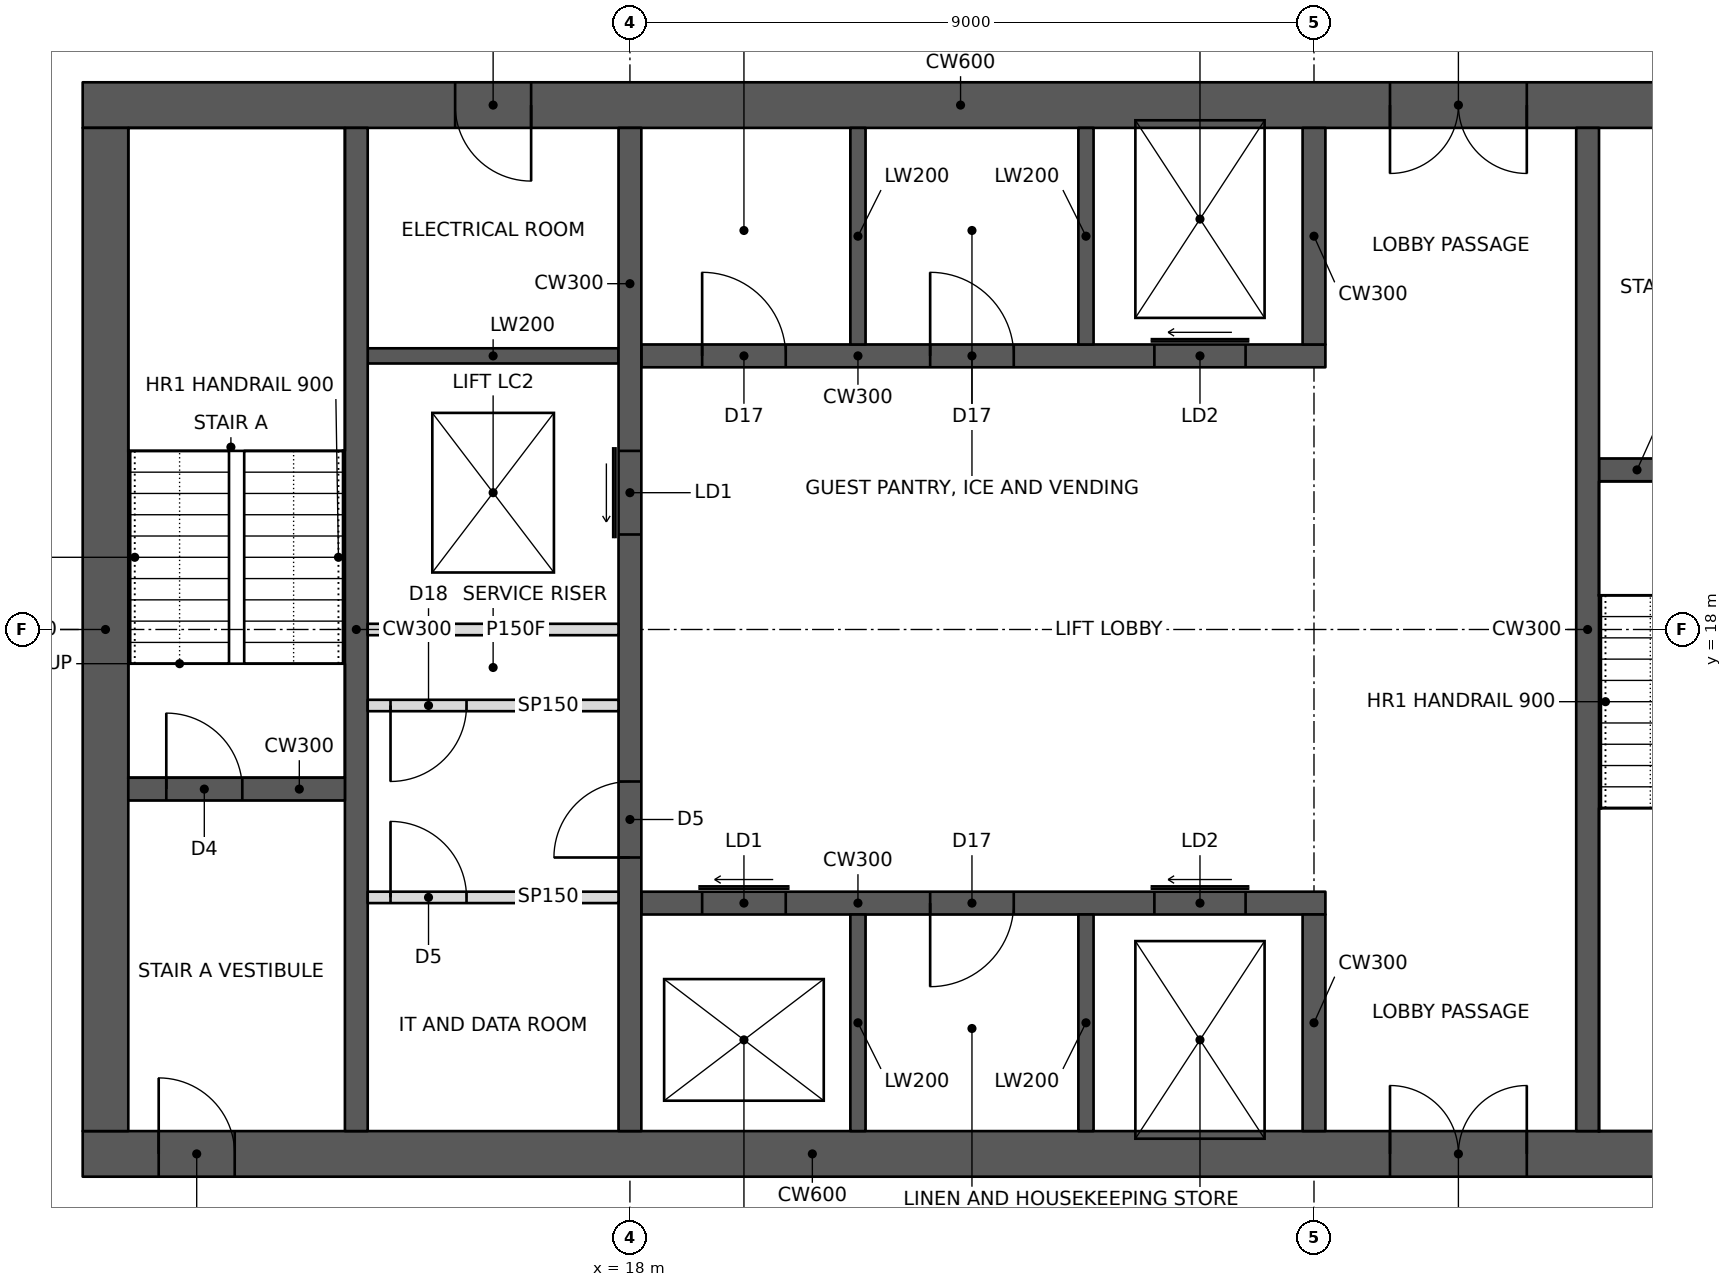
"""IFC4 building model, lengths in metres.
Left out: names, types, materials, properties, quantities, classifications, styles, units other than length and angle.
Written with IfcOpenShell. Run it as: python <this file> out.ifc"""

import sys

from ifc_helpers import new_model, si_unit, direction, frame, frame_2d, origin, place, context, subcontext, project, spatial, rectangle, extrude, element, fill, save


model = new_model("IFC4")
c1 = context("Model", 3, precision=1e-05, world=origin(), true_north=direction((0.0, 1.0)))
c2 = subcontext(c1, "Body", "Model", "MODEL_VIEW")
j1 = project(units=[si_unit("LENGTHUNIT", "METRE"), si_unit("PLANEANGLEUNIT", "RADIAN")], contexts=[c1])
p1 = place(None, origin())
s1 = spatial("IfcSite", under=j1, at=p1, CompositionType="ELEMENT")
p2 = place(p1, origin())
s2 = spatial("IfcBuilding", under=s1, at=p2, CompositionType="ELEMENT")
p3 = place(p2, frame((0.0, 0.0, 233.8)))
s3 = spatial("IfcBuildingStorey", under=s2, at=p3, CompositionType="ELEMENT", Elevation=233.8)
p4 = place(p3, frame((10.8, 11.1, 0.0), z_axis=(0.0, 0.0, 1.0), x_axis=(1.0, 0.0, 0.0)))
e1 = element("IfcWall", 1, at=p4, inside=s3, PredefinedType="SHEAR", context=c2, shape_type="SweptSolid", body=[
    extrude(rectangle(XDim=23.4, YDim=0.6, at=frame_2d((11.7, 0.0))), origin(), (0.0, 0.0, 1.0), 3.6),
])
p5 = place(p4, frame((1.0, 0.0, 0.0)))
e2 = element("IfcOpeningElement", 2, at=p5, cuts=e1, PredefinedType="OPENING", context=c2, shape_type="SweptSolid", body=[
    extrude(rectangle(XDim=1.0, YDim=2.1, at=frame_2d((0.5, 1.05))), frame((0.0, 0.31, 0.0), z_axis=(0.0, -1.0, 0.0), x_axis=(1.0, 0.0, 0.0)), (0.0, 0.0, 1.0), 0.62),
])
p6 = place(p4, frame((17.2, 0.0, 0.0)))
e3 = element("IfcOpeningElement", 3, at=p6, cuts=e1, PredefinedType="OPENING", context=c2, shape_type="SweptSolid", body=[
    extrude(rectangle(XDim=1.8, YDim=2.1, at=frame_2d((0.9, 1.05))), frame((0.0, 0.31, 0.0), z_axis=(0.0, -1.0, 0.0), x_axis=(1.0, 0.0, 0.0)), (0.0, 0.0, 1.0), 0.62),
])
p7 = place(p3, frame((10.8, 24.9, 0.0), z_axis=(0.0, 0.0, 1.0), x_axis=(1.0, 0.0, 0.0)))
e4 = element("IfcWall", 4, at=p7, inside=s3, PredefinedType="SHEAR", context=c2, shape_type="SweptSolid", body=[
    extrude(rectangle(XDim=23.4, YDim=0.6, at=frame_2d((11.7, 0.0))), origin(), (0.0, 0.0, 1.0), 3.6),
])
p8 = place(p7, frame((17.2, 0.0, 0.0)))
e5 = element("IfcOpeningElement", 5, at=p8, cuts=e4, PredefinedType="OPENING", context=c2, shape_type="SweptSolid", body=[
    extrude(rectangle(XDim=1.8, YDim=2.1, at=frame_2d((0.9, 1.05))), frame((0.0, 0.31, 0.0), z_axis=(0.0, -1.0, 0.0), x_axis=(1.0, 0.0, 0.0)), (0.0, 0.0, 1.0), 0.62),
])
p9 = place(p7, frame((21.1, 0.0, 0.0)))
e6 = element("IfcOpeningElement", 6, at=p9, cuts=e4, PredefinedType="OPENING", context=c2, shape_type="SweptSolid", body=[
    extrude(rectangle(XDim=1.0, YDim=2.1, at=frame_2d((0.5, 1.05))), frame((0.0, 0.31, 0.0), z_axis=(0.0, -1.0, 0.0), x_axis=(1.0, 0.0, 0.0)), (0.0, 0.0, 1.0), 0.62),
])
p10 = place(p7, frame((4.9, 0.0, 0.0)))
e7 = element("IfcOpeningElement", 7, at=p10, cuts=e4, PredefinedType="OPENING", context=c2, shape_type="SweptSolid", body=[
    extrude(rectangle(XDim=1.0, YDim=2.1, at=frame_2d((0.5, 1.05))), frame((0.0, 0.31, 0.0), z_axis=(0.0, -1.0, 0.0), x_axis=(1.0, 0.0, 0.0)), (0.0, 0.0, 1.0), 0.62),
])
p11 = place(p3, frame((11.1, 11.4, 0.0), z_axis=(0.0, 0.0, 1.0), x_axis=(0.0, 1.0, 0.0)))
e8 = element("IfcWall", 8, at=p11, inside=s3, PredefinedType="SHEAR", context=c2, shape_type="SweptSolid", body=[
    extrude(rectangle(XDim=13.2, YDim=0.6, at=frame_2d((6.6, 0.0))), origin(), (0.0, 0.0, 1.0), 3.6),
])
p12 = place(p3, frame((14.4, 11.4, 0.0), z_axis=(0.0, 0.0, 1.0), x_axis=(0.0, 1.0, 0.0)))
e9 = element("IfcWall", 9, at=p12, inside=s3, PredefinedType="SHEAR", context=c2, shape_type="SweptSolid", body=[
    extrude(rectangle(XDim=13.2, YDim=0.3, at=frame_2d((6.6, 0.0))), origin(), (0.0, 0.0, 1.0), 3.6),
])
p13 = place(p3, frame((11.4, 15.9, 0.0), z_axis=(0.0, 0.0, 1.0), x_axis=(1.0, 0.0, 0.0)))
e10 = element("IfcWall", 10, at=p13, inside=s3, PredefinedType="SHEAR", context=c2, shape_type="SweptSolid", body=[
    extrude(rectangle(XDim=2.85, YDim=0.3, at=frame_2d((1.425, 0.0))), origin(), (0.0, 0.0, 1.0), 3.6),
])
p14 = place(p13, frame((0.5, 0.0, 0.0)))
e11 = element("IfcOpeningElement", 11, at=p14, cuts=e10, PredefinedType="OPENING", context=c2, shape_type="SweptSolid", body=[
    extrude(rectangle(XDim=1.0, YDim=2.1, at=frame_2d((0.5, 1.05))), frame((0.0, 0.16, 0.0), z_axis=(0.0, -1.0, 0.0), x_axis=(1.0, 0.0, 0.0)), (0.0, 0.0, 1.0), 0.32),
])
p15 = place(p3, frame((18.0, 11.4, 0.0), z_axis=(0.0, 0.0, 1.0), x_axis=(0.0, 1.0, 0.0)))
e12 = element("IfcWall", 12, at=p15, inside=s3, PredefinedType="SHEAR", context=c2, shape_type="SweptSolid", body=[
    extrude(rectangle(XDim=13.2, YDim=0.3, at=frame_2d((6.6, 0.0))), origin(), (0.0, 0.0, 1.0), 3.6),
])
p16 = place(p15, frame((3.6, 0.0, 0.0)))
e13 = element("IfcOpeningElement", 13, at=p16, cuts=e12, PredefinedType="OPENING", context=c2, shape_type="SweptSolid", body=[
    extrude(rectangle(XDim=1.0, YDim=2.1, at=frame_2d((0.5, 1.05))), frame((0.0, 0.16, 0.0), z_axis=(0.0, -1.0, 0.0), x_axis=(1.0, 0.0, 0.0)), (0.0, 0.0, 1.0), 0.32),
])
p17 = place(p15, frame((7.85, 0.0, 0.0)))
e14 = element("IfcOpeningElement", 14, at=p17, cuts=e12, PredefinedType="OPENING", context=c2, shape_type="SweptSolid", body=[
    extrude(rectangle(XDim=1.1, YDim=2.1, at=frame_2d((0.55, 1.05))), frame((0.0, 0.16, 0.0), z_axis=(0.0, -1.0, 0.0), x_axis=(1.0, 0.0, 0.0)), (0.0, 0.0, 1.0), 0.32),
])
p18 = place(p3, frame((14.55, 18.0, 0.0), z_axis=(0.0, 0.0, 1.0), x_axis=(1.0, 0.0, 0.0)))
e15 = element("IfcWall", 15, at=p18, inside=s3, PredefinedType="PARTITIONING", context=c2, shape_type="SweptSolid", body=[
    extrude(rectangle(XDim=3.3, YDim=0.15, at=frame_2d((1.65, 0.0))), origin(), (0.0, 0.0, 1.0), 3.4),
])
p19 = place(p3, frame((18.15, 14.4, 0.0), z_axis=(0.0, 0.0, 1.0), x_axis=(1.0, 0.0, 0.0)))
e16 = element("IfcWall", 16, at=p19, inside=s3, PredefinedType="SHEAR", context=c2, shape_type="SweptSolid", body=[
    extrude(rectangle(XDim=9.0, YDim=0.3, at=frame_2d((4.5, 0.0))), origin(), (0.0, 0.0, 1.0), 3.6),
])
p20 = place(p19, frame((0.8, 0.0, 0.0)))
e17 = element("IfcOpeningElement", 17, at=p20, cuts=e16, PredefinedType="OPENING", context=c2, shape_type="SweptSolid", body=[
    extrude(rectangle(XDim=1.1, YDim=2.1, at=frame_2d((0.55, 1.05))), frame((0.0, 0.16, 0.0), z_axis=(0.0, -1.0, 0.0), x_axis=(1.0, 0.0, 0.0)), (0.0, 0.0, 1.0), 0.32),
])
p21 = place(p19, frame((6.75, 0.0, 0.0)))
e18 = element("IfcOpeningElement", 18, at=p21, cuts=e16, PredefinedType="OPENING", context=c2, shape_type="SweptSolid", body=[
    extrude(rectangle(XDim=1.2, YDim=2.1, at=frame_2d((0.6, 1.05))), frame((0.0, 0.16, 0.0), z_axis=(0.0, -1.0, 0.0), x_axis=(1.0, 0.0, 0.0)), (0.0, 0.0, 1.0), 0.32),
])
p22 = place(p19, frame((3.8, 0.0, 0.0)))
e19 = element("IfcOpeningElement", 19, at=p22, cuts=e16, PredefinedType="OPENING", context=c2, shape_type="SweptSolid", body=[
    extrude(rectangle(XDim=1.1, YDim=2.1, at=frame_2d((0.55, 1.05))), frame((0.0, 0.16, 0.0), z_axis=(0.0, -1.0, 0.0), x_axis=(1.0, 0.0, 0.0)), (0.0, 0.0, 1.0), 0.32),
])
p23 = place(p3, frame((27.0, 11.4, 0.0), z_axis=(0.0, 0.0, 1.0), x_axis=(0.0, 1.0, 0.0)))
e20 = element("IfcWall", 20, at=p23, inside=s3, PredefinedType="SHEAR", context=c2, shape_type="SweptSolid", body=[
    extrude(rectangle(XDim=2.85, YDim=0.3, at=frame_2d((1.425, 0.0))), origin(), (0.0, 0.0, 1.0), 3.6),
])
for number, where, z_axis, x_axis in (
    (21, (21.0, 11.4, 0.0), (0.0, 0.0, 1.0), (0.0, 1.0, 0.0)),
    (22, (24.0, 11.4, 0.0), (0.0, 0.0, 1.0), (0.0, 1.0, 0.0)),
):
    element("IfcWall", number, at=place(p3, frame(where, z_axis=z_axis, x_axis=x_axis)), inside=s3, PredefinedType="SHEAR", context=c2, shape_type="SweptSolid", body=[
        extrude(rectangle(XDim=2.85, YDim=0.2, at=frame_2d((1.425, 0.0))), origin(), (0.0, 0.0, 1.0), 3.6),
    ])
p24 = place(p3, frame((18.15, 21.6, 0.0), z_axis=(0.0, 0.0, 1.0), x_axis=(1.0, 0.0, 0.0)))
e23 = element("IfcWall", 23, at=p24, inside=s3, PredefinedType="SHEAR", context=c2, shape_type="SweptSolid", body=[
    extrude(rectangle(XDim=9.0, YDim=0.3, at=frame_2d((4.5, 0.0))), origin(), (0.0, 0.0, 1.0), 3.6),
])
p25 = place(p24, frame((6.75, 0.0, 0.0)))
e24 = element("IfcOpeningElement", 24, at=p25, cuts=e23, PredefinedType="OPENING", context=c2, shape_type="SweptSolid", body=[
    extrude(rectangle(XDim=1.2, YDim=2.1, at=frame_2d((0.6, 1.05))), frame((0.0, 0.16, 0.0), z_axis=(0.0, -1.0, 0.0), x_axis=(1.0, 0.0, 0.0)), (0.0, 0.0, 1.0), 0.32),
])
p26 = place(p24, frame((0.8, 0.0, 0.0)))
e25 = element("IfcOpeningElement", 25, at=p26, cuts=e23, PredefinedType="OPENING", context=c2, shape_type="SweptSolid", body=[
    extrude(rectangle(XDim=1.1, YDim=2.1, at=frame_2d((0.55, 1.05))), frame((0.0, 0.16, 0.0), z_axis=(0.0, -1.0, 0.0), x_axis=(1.0, 0.0, 0.0)), (0.0, 0.0, 1.0), 0.32),
])
p27 = place(p24, frame((3.8, 0.0, 0.0)))
e26 = element("IfcOpeningElement", 26, at=p27, cuts=e23, PredefinedType="OPENING", context=c2, shape_type="SweptSolid", body=[
    extrude(rectangle(XDim=1.1, YDim=2.1, at=frame_2d((0.55, 1.05))), frame((0.0, 0.16, 0.0), z_axis=(0.0, -1.0, 0.0), x_axis=(1.0, 0.0, 0.0)), (0.0, 0.0, 1.0), 0.32),
])
p28 = place(p3, frame((27.0, 21.75, 0.0), z_axis=(0.0, 0.0, 1.0), x_axis=(0.0, 1.0, 0.0)))
e27 = element("IfcWall", 27, at=p28, inside=s3, PredefinedType="SHEAR", context=c2, shape_type="SweptSolid", body=[
    extrude(rectangle(XDim=2.85, YDim=0.3, at=frame_2d((1.425, 0.0))), origin(), (0.0, 0.0, 1.0), 3.6),
])
for number, where, z_axis, x_axis in (
    (28, (21.0, 21.75, 0.0), (0.0, 0.0, 1.0), (0.0, 1.0, 0.0)),
    (29, (24.0, 21.75, 0.0), (0.0, 0.0, 1.0), (0.0, 1.0, 0.0)),
):
    element("IfcWall", number, at=place(p3, frame(where, z_axis=z_axis, x_axis=x_axis)), inside=s3, PredefinedType="SHEAR", context=c2, shape_type="SweptSolid", body=[
        extrude(rectangle(XDim=2.85, YDim=0.2, at=frame_2d((1.425, 0.0))), origin(), (0.0, 0.0, 1.0), 3.6),
    ])
p29 = place(p3, frame((30.6, 11.4, 0.0), z_axis=(0.0, 0.0, 1.0), x_axis=(0.0, 1.0, 0.0)))
e30 = element("IfcWall", 30, at=p29, inside=s3, PredefinedType="SHEAR", context=c2, shape_type="SweptSolid", body=[
    extrude(rectangle(XDim=13.2, YDim=0.3, at=frame_2d((6.6, 0.0))), origin(), (0.0, 0.0, 1.0), 3.6),
])
p30 = place(p3, frame((30.75, 20.1, 0.0), z_axis=(0.0, 0.0, 1.0), x_axis=(1.0, 0.0, 0.0)))
e31 = element("IfcWall", 31, at=p30, inside=s3, PredefinedType="SHEAR", context=c2, shape_type="SweptSolid", body=[
    extrude(rectangle(XDim=2.85, YDim=0.3, at=frame_2d((1.425, 0.0))), origin(), (0.0, 0.0, 1.0), 3.6),
])
p31 = place(p30, frame((1.15, 0.0, 0.0)))
e32 = element("IfcOpeningElement", 32, at=p31, cuts=e31, PredefinedType="OPENING", context=c2, shape_type="SweptSolid", body=[
    extrude(rectangle(XDim=1.0, YDim=2.1, at=frame_2d((0.5, 1.05))), frame((0.0, 0.16, 0.0), z_axis=(0.0, -1.0, 0.0), x_axis=(1.0, 0.0, 0.0)), (0.0, 0.0, 1.0), 0.32),
])
p32 = place(p3, frame((14.55, 21.6, 0.0), z_axis=(0.0, 0.0, 1.0), x_axis=(1.0, 0.0, 0.0)))
e33 = element("IfcWall", 33, at=p32, inside=s3, PredefinedType="SHEAR", context=c2, shape_type="SweptSolid", body=[
    extrude(rectangle(XDim=3.3, YDim=0.2, at=frame_2d((1.65, 0.0))), origin(), (0.0, 0.0, 1.0), 3.6),
])
p33 = place(p3, frame((14.55, 17.0, 0.0), z_axis=(0.0, 0.0, 1.0), x_axis=(1.0, 0.0, 0.0)))
e34 = element("IfcWall", 34, at=p33, inside=s3, PredefinedType="PARTITIONING", context=c2, shape_type="SweptSolid", body=[
    extrude(rectangle(XDim=3.3, YDim=0.15, at=frame_2d((1.65, 0.0))), origin(), (0.0, 0.0, 1.0), 3.4),
])
p34 = place(p33, frame((0.3, 0.0, 0.0)))
e35 = element("IfcOpeningElement", 35, at=p34, cuts=e34, PredefinedType="OPENING", context=c2, shape_type="SweptSolid", body=[
    extrude(rectangle(XDim=1.0, YDim=2.1, at=frame_2d((0.5, 1.05))), frame((0.0, 0.085, 0.0), z_axis=(0.0, -1.0, 0.0), x_axis=(1.0, 0.0, 0.0)), (0.0, 0.0, 1.0), 0.17),
])
p35 = place(p3, frame((14.55, 14.475, 0.0), z_axis=(0.0, 0.0, 1.0), x_axis=(1.0, 0.0, 0.0)))
e36 = element("IfcWall", 36, at=p35, inside=s3, PredefinedType="PARTITIONING", context=c2, shape_type="SweptSolid", body=[
    extrude(rectangle(XDim=3.3, YDim=0.15, at=frame_2d((1.65, 0.0))), origin(), (0.0, 0.0, 1.0), 3.4),
])
p36 = place(p35, frame((0.3, 0.0, 0.0)))
e37 = element("IfcOpeningElement", 37, at=p36, cuts=e36, PredefinedType="OPENING", context=c2, shape_type="SweptSolid", body=[
    extrude(rectangle(XDim=1.0, YDim=2.1, at=frame_2d((0.5, 1.05))), frame((0.0, 0.085, 0.0), z_axis=(0.0, -1.0, 0.0), x_axis=(1.0, 0.0, 0.0)), (0.0, 0.0, 1.0), 0.17),
])
p37 = place(p34, frame((1.0, 0.0, 0.0), z_axis=(0.0, 0.0, 1.0), x_axis=(-1.0, 0.0, 0.0)))
e38 = element("IfcDoor", 38, at=p37, inside=s3, OperationType="SINGLE_SWING_RIGHT", PredefinedType="DOOR", context=c2, shape_type="SweptSolid", body=[
    extrude(rectangle(XDim=1.0, YDim=2.1, at=frame_2d((0.5, 1.05))), frame((0.0, 0.025, 0.0), z_axis=(0.0, -1.0, 0.0), x_axis=(1.0, 0.0, 0.0)), (0.0, 0.0, 1.0), 0.05),
])
fill(e35, e38)
p38 = place(p36, origin())
e39 = element("IfcDoor", 39, at=p38, inside=s3, OperationType="SINGLE_SWING_LEFT", PredefinedType="DOOR", context=c2, shape_type="SweptSolid", body=[
    extrude(rectangle(XDim=1.0, YDim=2.1, at=frame_2d((0.5, 1.05))), frame((0.0, 0.025, 0.0), z_axis=(0.0, -1.0, 0.0), x_axis=(1.0, 0.0, 0.0)), (0.0, 0.0, 1.0), 0.05),
])
fill(e37, e39)
p39 = place(p5, origin())
e40 = element("IfcDoor", 40, at=p39, inside=s3, OperationType="SINGLE_SWING_LEFT", PredefinedType="DOOR", context=c2, shape_type="SweptSolid", body=[
    extrude(rectangle(XDim=1.0, YDim=2.1, at=frame_2d((0.5, 1.05))), frame((0.0, 0.025, 0.0), z_axis=(0.0, -1.0, 0.0), x_axis=(1.0, 0.0, 0.0)), (0.0, 0.0, 1.0), 0.05),
])
fill(e2, e40)
p40 = place(p14, origin())
e41 = element("IfcDoor", 41, at=p40, inside=s3, OperationType="SINGLE_SWING_LEFT", PredefinedType="DOOR", context=c2, shape_type="SweptSolid", body=[
    extrude(rectangle(XDim=1.0, YDim=2.1, at=frame_2d((0.5, 1.05))), frame((0.0, 0.025, 0.0), z_axis=(0.0, -1.0, 0.0), x_axis=(1.0, 0.0, 0.0)), (0.0, 0.0, 1.0), 0.05),
])
fill(e11, e41)
p41 = place(p6, origin())
e42 = element("IfcDoor", 42, at=p41, inside=s3, OperationType="DOUBLE_DOOR_SINGLE_SWING", PredefinedType="DOOR", context=c2, shape_type="SweptSolid", body=[
    extrude(rectangle(XDim=1.8, YDim=2.1, at=frame_2d((0.9, 1.05))), frame((0.0, 0.025, 0.0), z_axis=(0.0, -1.0, 0.0), x_axis=(1.0, 0.0, 0.0)), (0.0, 0.0, 1.0), 0.05),
])
fill(e3, e42)
p42 = place(p8, frame((1.8, 0.0, 0.0), z_axis=(0.0, 0.0, 1.0), x_axis=(-1.0, 0.0, 0.0)))
e43 = element("IfcDoor", 43, at=p42, inside=s3, OperationType="DOUBLE_DOOR_SINGLE_SWING", PredefinedType="DOOR", context=c2, shape_type="SweptSolid", body=[
    extrude(rectangle(XDim=1.8, YDim=2.1, at=frame_2d((0.9, 1.05))), frame((0.0, 0.025, 0.0), z_axis=(0.0, -1.0, 0.0), x_axis=(1.0, 0.0, 0.0)), (0.0, 0.0, 1.0), 0.05),
])
fill(e5, e43)
p43 = place(p16, origin())
e44 = element("IfcDoor", 44, at=p43, inside=s3, OperationType="SINGLE_SWING_LEFT", PredefinedType="DOOR", context=c2, shape_type="SweptSolid", body=[
    extrude(rectangle(XDim=1.0, YDim=2.1, at=frame_2d((0.5, 1.05))), frame((0.0, 0.025, 0.0), z_axis=(0.0, -1.0, 0.0), x_axis=(1.0, 0.0, 0.0)), (0.0, 0.0, 1.0), 0.05),
])
fill(e13, e44)
p44 = place(p10, frame((1.0, 0.0, 0.0), z_axis=(0.0, 0.0, 1.0), x_axis=(-1.0, 0.0, 0.0)))
e45 = element("IfcDoor", 45, at=p44, inside=s3, OperationType="SINGLE_SWING_LEFT", PredefinedType="DOOR", context=c2, shape_type="SweptSolid", body=[
    extrude(rectangle(XDim=1.0, YDim=2.1, at=frame_2d((0.5, 1.05))), frame((0.0, 0.025, 0.0), z_axis=(0.0, -1.0, 0.0), x_axis=(1.0, 0.0, 0.0)), (0.0, 0.0, 1.0), 0.05),
])
fill(e7, e45)
p45 = place(p20, origin())
e46 = element("IfcDoor", 46, at=p45, inside=s3, OperationType="SLIDING_TO_LEFT", PredefinedType="DOOR", context=c2, shape_type="SweptSolid", body=[
    extrude(rectangle(XDim=1.1, YDim=2.1, at=frame_2d((0.55, 1.05))), frame((0.0, 0.025, 0.0), z_axis=(0.0, -1.0, 0.0), x_axis=(1.0, 0.0, 0.0)), (0.0, 0.0, 1.0), 0.05),
])
fill(e17, e46)
p46 = place(p17, origin())
e47 = element("IfcDoor", 47, at=p46, inside=s3, OperationType="SLIDING_TO_LEFT", PredefinedType="DOOR", context=c2, shape_type="SweptSolid", body=[
    extrude(rectangle(XDim=1.1, YDim=2.1, at=frame_2d((0.55, 1.05))), frame((0.0, 0.025, 0.0), z_axis=(0.0, -1.0, 0.0), x_axis=(1.0, 0.0, 0.0)), (0.0, 0.0, 1.0), 0.05),
])
fill(e14, e47)
p47 = place(p21, origin())
e48 = element("IfcDoor", 48, at=p47, inside=s3, OperationType="SLIDING_TO_LEFT", PredefinedType="DOOR", context=c2, shape_type="SweptSolid", body=[
    extrude(rectangle(XDim=1.2, YDim=2.1, at=frame_2d((0.6, 1.05))), frame((0.0, 0.025, 0.0), z_axis=(0.0, -1.0, 0.0), x_axis=(1.0, 0.0, 0.0)), (0.0, 0.0, 1.0), 0.05),
])
fill(e18, e48)
p48 = place(p25, origin())
e49 = element("IfcDoor", 49, at=p48, inside=s3, OperationType="SLIDING_TO_LEFT", PredefinedType="DOOR", context=c2, shape_type="SweptSolid", body=[
    extrude(rectangle(XDim=1.2, YDim=2.1, at=frame_2d((0.6, 1.05))), frame((0.0, 0.025, 0.0), z_axis=(0.0, -1.0, 0.0), x_axis=(1.0, 0.0, 0.0)), (0.0, 0.0, 1.0), 0.05),
])
fill(e24, e49)
p49 = place(p26, origin())
e50 = element("IfcDoor", 50, at=p49, inside=s3, OperationType="SINGLE_SWING_LEFT", PredefinedType="DOOR", context=c2, shape_type="SweptSolid", body=[
    extrude(rectangle(XDim=1.1, YDim=2.1, at=frame_2d((0.55, 1.05))), frame((0.0, 0.025, 0.0), z_axis=(0.0, -1.0, 0.0), x_axis=(1.0, 0.0, 0.0)), (0.0, 0.0, 1.0), 0.05),
])
fill(e25, e50)
p50 = place(p27, origin())
e51 = element("IfcDoor", 51, at=p50, inside=s3, OperationType="SINGLE_SWING_LEFT", PredefinedType="DOOR", context=c2, shape_type="SweptSolid", body=[
    extrude(rectangle(XDim=1.1, YDim=2.1, at=frame_2d((0.55, 1.05))), frame((0.0, 0.025, 0.0), z_axis=(0.0, -1.0, 0.0), x_axis=(1.0, 0.0, 0.0)), (0.0, 0.0, 1.0), 0.05),
])
fill(e26, e51)
p51 = place(p22, frame((1.1, 0.0, 0.0), z_axis=(0.0, 0.0, 1.0), x_axis=(-1.0, 0.0, 0.0)))
e52 = element("IfcDoor", 52, at=p51, inside=s3, OperationType="SINGLE_SWING_RIGHT", PredefinedType="DOOR", context=c2, shape_type="SweptSolid", body=[
    extrude(rectangle(XDim=1.1, YDim=2.1, at=frame_2d((0.55, 1.05))), frame((0.0, 0.025, 0.0), z_axis=(0.0, -1.0, 0.0), x_axis=(1.0, 0.0, 0.0)), (0.0, 0.0, 1.0), 0.05),
])
fill(e19, e52)
save(model, sys.argv[1])
